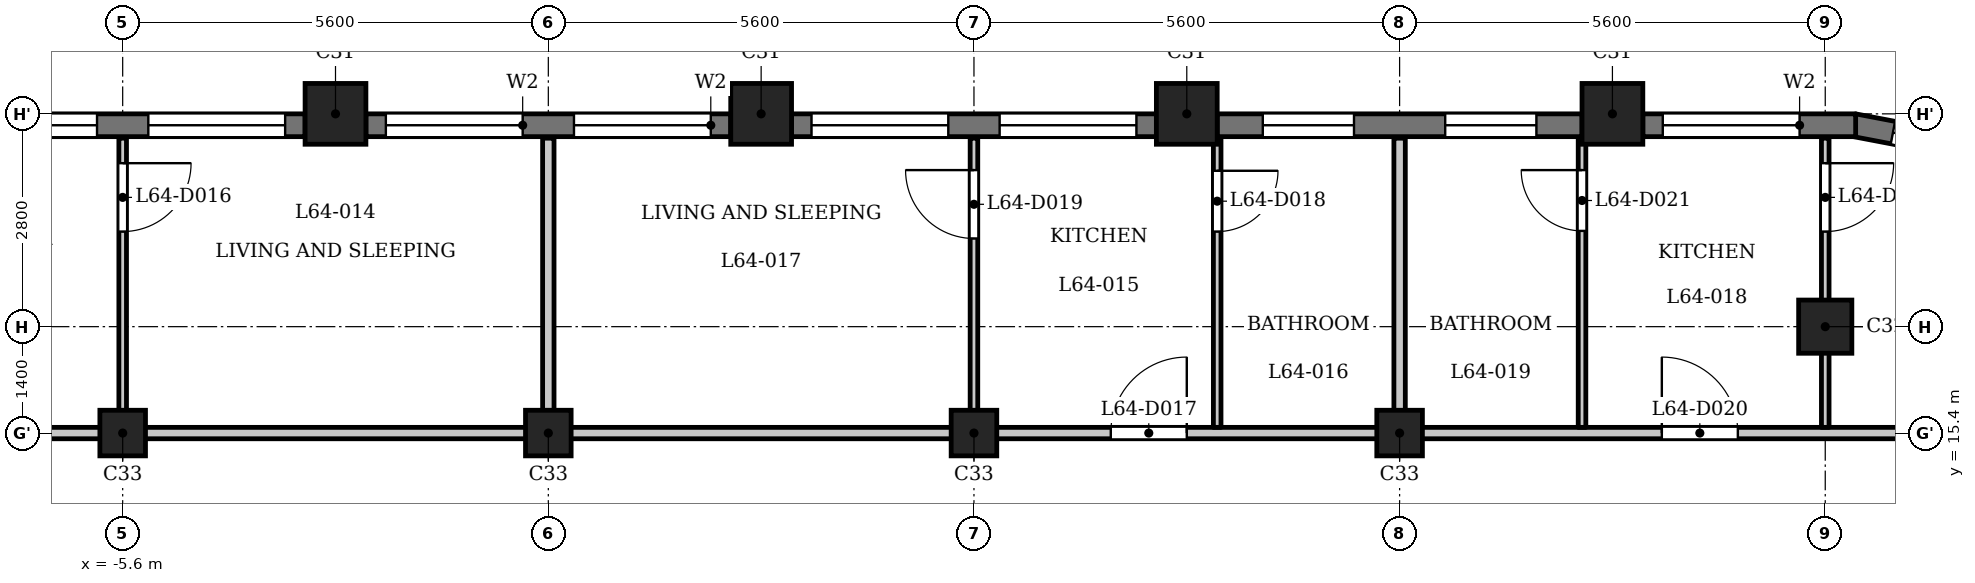
"""IFC4 building model, lengths in metres.
Left out: names, types, materials, properties, quantities, classifications, styles, units other than length and angle.
Written with IfcOpenShell. Run it as: python <this file> out.ifc"""

import sys

from ifc_helpers import new_model, si_unit, direction, frame, frame_2d, origin, origin_2d, place, context, subcontext, project, spatial, rectangle, extrude, element, fill, save


model = new_model("IFC4")
c1 = context("Model", 3, precision=1e-05, world=origin(), true_north=direction((0.0, 1.0)))
c2 = subcontext(c1, "Body", "Model", "MODEL_VIEW")
j1 = project(units=[si_unit("LENGTHUNIT", "METRE"), si_unit("PLANEANGLEUNIT", "RADIAN")], contexts=[c1])
p1 = place(None, origin())
s1 = spatial("IfcSite", under=j1, at=p1, CompositionType="ELEMENT")
p2 = place(p1, origin())
s2 = spatial("IfcBuilding", under=s1, at=p2, CompositionType="ELEMENT")
p3 = place(p2, frame((0.0, 0.0, 248.7)))
s3 = spatial("IfcBuildingStorey", under=s2, at=p3, CompositionType="ELEMENT", Elevation=248.7)
for number, where, z_axis, x_axis in (
    (1, (14.0, 19.6, 0.0), (0.0, 0.0, 1.0), (1.0, 0.0, 0.0)),
    (2, (8.4, 19.6, 0.0), (0.0, 0.0, 1.0), (1.0, 0.0, 0.0)),
    (3, (2.8, 19.6, 0.0), (0.0, 0.0, 1.0), (1.0, 0.0, 0.0)),
    (4, (-2.8, 19.6, 0.0), (0.0, 0.0, 1.0), (1.0, 0.0, 0.0)),
):
    element("IfcColumn", number, at=place(p3, frame(where, z_axis=z_axis, x_axis=x_axis)), inside=s3, PredefinedType="COLUMN", context=c2, shape_type="SweptSolid", body=[
        extrude(rectangle(XDim=0.8, YDim=0.8, at=origin_2d()), origin(), (0.0, 0.0, 1.0), 3.5),
    ])
p4 = place(p3, frame((16.8, 16.8, 0.0), z_axis=(0.0, 0.0, 1.0), x_axis=(1.0, 0.0, 0.0)))
e5 = element("IfcColumn", 5, at=p4, inside=s3, PredefinedType="COLUMN", context=c2, shape_type="SweptSolid", body=[
    extrude(rectangle(XDim=0.7, YDim=0.7, at=origin_2d()), origin(), (0.0, 0.0, 1.0), 3.5),
])
for number, where, z_axis, x_axis in (
    (6, (-5.6, 15.4, 0.0), (0.0, 0.0, 1.0), (1.0, 0.0, 0.0)),
    (7, (0.0, 15.4, 0.0), (0.0, 0.0, 1.0), (1.0, 0.0, 0.0)),
    (8, (5.6, 15.4, 0.0), (0.0, 0.0, 1.0), (1.0, 0.0, 0.0)),
    (9, (11.2, 15.4, 0.0), (0.0, 0.0, 1.0), (1.0, 0.0, 0.0)),
):
    element("IfcColumn", number, at=place(p3, frame(where, z_axis=z_axis, x_axis=x_axis)), inside=s3, PredefinedType="COLUMN", context=c2, shape_type="SweptSolid", body=[
        extrude(rectangle(XDim=0.6, YDim=0.6, at=origin_2d()), origin(), (0.0, 0.0, 1.0), 3.5),
    ])
p5 = place(p3, frame((18.995, 19.105, 0.0), z_axis=(0.0, 0.0, 1.0), x_axis=(-0.982301706131, 0.187305520826, 0.0)))
e10 = element("IfcWall", 10, at=p5, inside=s3, PredefinedType="SOLIDWALL", context=c2, shape_type="SweptSolid", body=[
    extrude(rectangle(XDim=1.856, YDim=0.3, at=frame_2d((0.928, 0.0))), origin(), (0.0, 0.0, 1.0), 2.55),
])
p6 = place(p5, frame((0.528, 0.0, 0.6)))
e11 = element("IfcOpeningElement", 11, at=p6, cuts=e10, PredefinedType="OPENING", context=c2, shape_type="SweptSolid", body=[
    extrude(rectangle(XDim=0.8, YDim=1.55, at=frame_2d((0.4, 0.775))), frame((0.0, 0.16, 0.0), z_axis=(0.0, -1.0, 0.0), x_axis=(1.0, 0.0, 0.0)), (0.0, 0.0, 1.0), 0.32),
])
p7 = place(p3, frame((17.2, 19.45, 0.0), z_axis=(0.0, 0.0, 1.0), x_axis=(-1.0, 0.0, 0.0)))
e12 = element("IfcWall", 12, at=p7, inside=s3, PredefinedType="SOLIDWALL", context=c2, shape_type="SweptSolid", body=[
    extrude(rectangle(XDim=2.8, YDim=0.3, at=frame_2d((1.4, 0.0))), origin(), (0.0, 0.0, 1.0), 2.55),
])
p8 = place(p7, frame((0.738, 0.0, 0.9)))
e13 = element("IfcOpeningElement", 13, at=p8, cuts=e12, PredefinedType="OPENING", context=c2, shape_type="SweptSolid", body=[
    extrude(rectangle(XDim=1.8, YDim=1.25, at=frame_2d((0.9, 0.625))), frame((0.0, 0.16, 0.0), z_axis=(0.0, -1.0, 0.0), x_axis=(1.0, 0.0, 0.0)), (0.0, 0.0, 1.0), 0.32),
])
p9 = place(p3, frame((13.6, 19.45, 0.0), z_axis=(0.0, 0.0, 1.0), x_axis=(-1.0, 0.0, 0.0)))
e14 = element("IfcWall", 14, at=p9, inside=s3, PredefinedType="SOLIDWALL", context=c2, shape_type="SweptSolid", body=[
    extrude(rectangle(XDim=4.8, YDim=0.3, at=frame_2d((2.4, 0.0))), origin(), (0.0, 0.0, 1.0), 2.55),
])
p10 = place(p9, frame((0.6, 0.0, 0.6)))
e15 = element("IfcOpeningElement", 15, at=p10, cuts=e14, PredefinedType="OPENING", context=c2, shape_type="SweptSolid", body=[
    extrude(rectangle(XDim=1.2, YDim=1.55, at=frame_2d((0.6, 0.775))), frame((0.0, 0.16, 0.0), z_axis=(0.0, -1.0, 0.0), x_axis=(1.0, 0.0, 0.0)), (0.0, 0.0, 1.0), 0.32),
])
p11 = place(p9, frame((3.0, 0.0, 0.6)))
e16 = element("IfcOpeningElement", 16, at=p11, cuts=e14, PredefinedType="OPENING", context=c2, shape_type="SweptSolid", body=[
    extrude(rectangle(XDim=1.2, YDim=1.55, at=frame_2d((0.6, 0.775))), frame((0.0, 0.16, 0.0), z_axis=(0.0, -1.0, 0.0), x_axis=(1.0, 0.0, 0.0)), (0.0, 0.0, 1.0), 0.32),
])
p12 = place(p3, frame((8.0, 19.45, 0.0), z_axis=(0.0, 0.0, 1.0), x_axis=(-1.0, 0.0, 0.0)))
e17 = element("IfcWall", 17, at=p12, inside=s3, PredefinedType="SOLIDWALL", context=c2, shape_type="SweptSolid", body=[
    extrude(rectangle(XDim=4.8, YDim=0.3, at=frame_2d((2.4, 0.0))), origin(), (0.0, 0.0, 1.0), 2.55),
])
p13 = place(p12, frame((0.262, 0.0, 0.9)))
e18 = element("IfcOpeningElement", 18, at=p13, cuts=e17, PredefinedType="OPENING", context=c2, shape_type="SweptSolid", body=[
    extrude(rectangle(XDim=1.8, YDim=1.25, at=frame_2d((0.9, 0.625))), frame((0.0, 0.16, 0.0), z_axis=(0.0, -1.0, 0.0), x_axis=(1.0, 0.0, 0.0)), (0.0, 0.0, 1.0), 0.32),
])
p14 = place(p12, frame((2.738, 0.0, 0.9)))
e19 = element("IfcOpeningElement", 19, at=p14, cuts=e17, PredefinedType="OPENING", context=c2, shape_type="SweptSolid", body=[
    extrude(rectangle(XDim=1.8, YDim=1.25, at=frame_2d((0.9, 0.625))), frame((0.0, 0.16, 0.0), z_axis=(0.0, -1.0, 0.0), x_axis=(1.0, 0.0, 0.0)), (0.0, 0.0, 1.0), 0.32),
])
p15 = place(p3, frame((2.4, 19.45, 0.0), z_axis=(0.0, 0.0, 1.0), x_axis=(-1.0, 0.0, 0.0)))
e20 = element("IfcWall", 20, at=p15, inside=s3, PredefinedType="SOLIDWALL", context=c2, shape_type="SweptSolid", body=[
    extrude(rectangle(XDim=4.8, YDim=0.3, at=frame_2d((2.4, 0.0))), origin(), (0.0, 0.0, 1.0), 2.55),
])
p16 = place(p15, frame((0.262, 0.0, 0.9)))
e21 = element("IfcOpeningElement", 21, at=p16, cuts=e20, PredefinedType="OPENING", context=c2, shape_type="SweptSolid", body=[
    extrude(rectangle(XDim=1.8, YDim=1.25, at=frame_2d((0.9, 0.625))), frame((0.0, 0.16, 0.0), z_axis=(0.0, -1.0, 0.0), x_axis=(1.0, 0.0, 0.0)), (0.0, 0.0, 1.0), 0.32),
])
p17 = place(p15, frame((2.738, 0.0, 0.9)))
e22 = element("IfcOpeningElement", 22, at=p17, cuts=e20, PredefinedType="OPENING", context=c2, shape_type="SweptSolid", body=[
    extrude(rectangle(XDim=1.8, YDim=1.25, at=frame_2d((0.9, 0.625))), frame((0.0, 0.16, 0.0), z_axis=(0.0, -1.0, 0.0), x_axis=(1.0, 0.0, 0.0)), (0.0, 0.0, 1.0), 0.32),
])
p18 = place(p3, frame((-3.2, 19.45, 0.0), z_axis=(0.0, 0.0, 1.0), x_axis=(-1.0, 0.0, 0.0)))
e23 = element("IfcWall", 23, at=p18, inside=s3, PredefinedType="SOLIDWALL", context=c2, shape_type="SweptSolid", body=[
    extrude(rectangle(XDim=4.8, YDim=0.3, at=frame_2d((2.4, 0.0))), origin(), (0.0, 0.0, 1.0), 2.55),
])
p19 = place(p18, frame((0.262, 0.0, 0.9)))
e24 = element("IfcOpeningElement", 24, at=p19, cuts=e23, PredefinedType="OPENING", context=c2, shape_type="SweptSolid", body=[
    extrude(rectangle(XDim=1.8, YDim=1.25, at=frame_2d((0.9, 0.625))), frame((0.0, 0.16, 0.0), z_axis=(0.0, -1.0, 0.0), x_axis=(1.0, 0.0, 0.0)), (0.0, 0.0, 1.0), 0.32),
])
p20 = place(p18, frame((2.738, 0.0, 0.9)))
e25 = element("IfcOpeningElement", 25, at=p20, cuts=e23, PredefinedType="OPENING", context=c2, shape_type="SweptSolid", body=[
    extrude(rectangle(XDim=1.8, YDim=1.25, at=frame_2d((0.9, 0.625))), frame((0.0, 0.16, 0.0), z_axis=(0.0, -1.0, 0.0), x_axis=(1.0, 0.0, 0.0)), (0.0, 0.0, 1.0), 0.32),
])
p21 = place(p3, frame((-23.55, 15.4, 0.0), z_axis=(0.0, 0.0, 1.0), x_axis=(1.0, 0.0, 0.0)))
e26 = element("IfcWall", 26, at=p21, inside=s3, PredefinedType="PARTITIONING", context=c2, shape_type="SweptSolid", body=[
    extrude(rectangle(XDim=46.872, YDim=0.15, at=frame_2d((23.436, 0.0))), origin(), (0.0, 0.0, 1.0), 3.2),
])
p22 = place(p21, frame((8.05, 0.0, 0.0)))
e27 = element("IfcOpeningElement", 27, at=p22, cuts=e26, PredefinedType="OPENING", context=c2, shape_type="SweptSolid", body=[
    extrude(rectangle(XDim=1.0, YDim=2.1, at=frame_2d((0.5, 1.05))), frame((0.0, 0.085, 0.0), z_axis=(0.0, -1.0, 0.0), x_axis=(1.0, 0.0, 0.0)), (0.0, 0.0, 1.0), 0.17),
])
p23 = place(p21, frame((15.05, 0.0, 0.0)))
e28 = element("IfcOpeningElement", 28, at=p23, cuts=e26, PredefinedType="OPENING", context=c2, shape_type="SweptSolid", body=[
    extrude(rectangle(XDim=1.0, YDim=2.1, at=frame_2d((0.5, 1.05))), frame((0.0, 0.085, 0.0), z_axis=(0.0, -1.0, 0.0), x_axis=(1.0, 0.0, 0.0)), (0.0, 0.0, 1.0), 0.17),
])
p24 = place(p21, frame((30.95, 0.0, 0.0)))
e29 = element("IfcOpeningElement", 29, at=p24, cuts=e26, PredefinedType="OPENING", context=c2, shape_type="SweptSolid", body=[
    extrude(rectangle(XDim=1.0, YDim=2.1, at=frame_2d((0.5, 1.05))), frame((0.0, 0.085, 0.0), z_axis=(0.0, -1.0, 0.0), x_axis=(1.0, 0.0, 0.0)), (0.0, 0.0, 1.0), 0.17),
])
p25 = place(p21, frame((38.2, 0.0, 0.0)))
e30 = element("IfcOpeningElement", 30, at=p25, cuts=e26, PredefinedType="OPENING", context=c2, shape_type="SweptSolid", body=[
    extrude(rectangle(XDim=1.0, YDim=2.1, at=frame_2d((0.5, 1.05))), frame((0.0, 0.085, 0.0), z_axis=(0.0, -1.0, 0.0), x_axis=(1.0, 0.0, 0.0)), (0.0, 0.0, 1.0), 0.17),
])
p26 = place(p3, frame((-5.6, 15.475, 0.0), z_axis=(0.0, 0.0, 1.0), x_axis=(0.0, 1.0, 0.0)))
e31 = element("IfcWall", 31, at=p26, inside=s3, PredefinedType="PARTITIONING", context=c2, shape_type="SweptSolid", body=[
    extrude(rectangle(XDim=3.805, YDim=0.1, at=frame_2d((1.902, 0.0))), origin(), (0.0, 0.0, 1.0), 3.2),
])
p27 = place(p26, frame((2.576, 0.0, 0.0)))
e32 = element("IfcOpeningElement", 32, at=p27, cuts=e31, PredefinedType="OPENING", context=c2, shape_type="SweptSolid", body=[
    extrude(rectangle(XDim=0.9, YDim=2.1, at=frame_2d((0.45, 1.05))), frame((0.0, 0.06, 0.0), z_axis=(0.0, -1.0, 0.0), x_axis=(1.0, 0.0, 0.0)), (0.0, 0.0, 1.0), 0.12),
])
p28 = place(p3, frame((0.0, 15.475, 0.0), z_axis=(0.0, 0.0, 1.0), x_axis=(0.0, 1.0, 0.0)))
e33 = element("IfcWall", 33, at=p28, inside=s3, PredefinedType="PARTITIONING", context=c2, shape_type="SweptSolid", body=[
    extrude(rectangle(XDim=3.805, YDim=0.15, at=frame_2d((1.902, 0.0))), origin(), (0.0, 0.0, 1.0), 3.2),
])
p29 = place(p3, frame((5.6, 15.475, 0.0), z_axis=(0.0, 0.0, 1.0), x_axis=(0.0, 1.0, 0.0)))
e34 = element("IfcWall", 34, at=p29, inside=s3, PredefinedType="PARTITIONING", context=c2, shape_type="SweptSolid", body=[
    extrude(rectangle(XDim=3.805, YDim=0.1, at=frame_2d((1.902, 0.0))), origin(), (0.0, 0.0, 1.0), 3.2),
])
p30 = place(p29, frame((2.485, 0.0, 0.0)))
e35 = element("IfcOpeningElement", 35, at=p30, cuts=e34, PredefinedType="OPENING", context=c2, shape_type="SweptSolid", body=[
    extrude(rectangle(XDim=0.9, YDim=2.1, at=frame_2d((0.45, 1.05))), frame((0.0, 0.06, 0.0), z_axis=(0.0, -1.0, 0.0), x_axis=(1.0, 0.0, 0.0)), (0.0, 0.0, 1.0), 0.12),
])
p31 = place(p3, frame((8.8, 15.475, 0.0), z_axis=(0.0, 0.0, 1.0), x_axis=(0.0, 1.0, 0.0)))
e36 = element("IfcWall", 36, at=p31, inside=s3, PredefinedType="PARTITIONING", context=c2, shape_type="SweptSolid", body=[
    extrude(rectangle(XDim=3.805, YDim=0.1, at=frame_2d((1.902, 0.0))), origin(), (0.0, 0.0, 1.0), 3.2),
])
p32 = place(p31, frame((2.576, 0.0, 0.0)))
e37 = element("IfcOpeningElement", 37, at=p32, cuts=e36, PredefinedType="OPENING", context=c2, shape_type="SweptSolid", body=[
    extrude(rectangle(XDim=0.8, YDim=2.1, at=frame_2d((0.4, 1.05))), frame((0.0, 0.06, 0.0), z_axis=(0.0, -1.0, 0.0), x_axis=(1.0, 0.0, 0.0)), (0.0, 0.0, 1.0), 0.12),
])
p33 = place(p3, frame((11.2, 15.475, 0.0), z_axis=(0.0, 0.0, 1.0), x_axis=(0.0, 1.0, 0.0)))
e38 = element("IfcWall", 38, at=p33, inside=s3, PredefinedType="PARTITIONING", context=c2, shape_type="SweptSolid", body=[
    extrude(rectangle(XDim=3.805, YDim=0.15, at=frame_2d((1.902, 0.0))), origin(), (0.0, 0.0, 1.0), 3.2),
])
p34 = place(p3, frame((13.6, 15.475, 0.0), z_axis=(0.0, 0.0, 1.0), x_axis=(0.0, 1.0, 0.0)))
e39 = element("IfcWall", 39, at=p34, inside=s3, PredefinedType="PARTITIONING", context=c2, shape_type="SweptSolid", body=[
    extrude(rectangle(XDim=3.805, YDim=0.1, at=frame_2d((1.902, 0.0))), origin(), (0.0, 0.0, 1.0), 3.2),
])
p35 = place(p34, frame((2.585, 0.0, 0.0)))
e40 = element("IfcOpeningElement", 40, at=p35, cuts=e39, PredefinedType="OPENING", context=c2, shape_type="SweptSolid", body=[
    extrude(rectangle(XDim=0.8, YDim=2.1, at=frame_2d((0.4, 1.05))), frame((0.0, 0.06, 0.0), z_axis=(0.0, -1.0, 0.0), x_axis=(1.0, 0.0, 0.0)), (0.0, 0.0, 1.0), 0.12),
])
p36 = place(p3, frame((16.8, 15.475, 0.0), z_axis=(0.0, 0.0, 1.0), x_axis=(0.0, 1.0, 0.0)))
e41 = element("IfcWall", 41, at=p36, inside=s3, PredefinedType="PARTITIONING", context=c2, shape_type="SweptSolid", body=[
    extrude(rectangle(XDim=3.805, YDim=0.1, at=frame_2d((1.902, 0.0))), origin(), (0.0, 0.0, 1.0), 3.2),
])
p37 = place(p36, frame((2.576, 0.0, 0.0)))
e42 = element("IfcOpeningElement", 42, at=p37, cuts=e41, PredefinedType="OPENING", context=c2, shape_type="SweptSolid", body=[
    extrude(rectangle(XDim=0.9, YDim=2.1, at=frame_2d((0.45, 1.05))), frame((0.0, 0.06, 0.0), z_axis=(0.0, -1.0, 0.0), x_axis=(1.0, 0.0, 0.0)), (0.0, 0.0, 1.0), 0.12),
])
p38 = place(p27, origin())
e43 = element("IfcDoor", 43, at=p38, inside=s3, OperationType="SINGLE_SWING_RIGHT", PredefinedType="DOOR", context=c2, shape_type="SweptSolid", body=[
    extrude(rectangle(XDim=0.9, YDim=2.1, at=frame_2d((0.45, 1.05))), frame((0.0, 0.025, 0.0), z_axis=(0.0, -1.0, 0.0), x_axis=(1.0, 0.0, 0.0)), (0.0, 0.0, 1.0), 0.05),
])
fill(e32, e43)
p39 = place(p24, origin())
e44 = element("IfcDoor", 44, at=p39, inside=s3, OperationType="SINGLE_SWING_LEFT", PredefinedType="DOOR", context=c2, shape_type="SweptSolid", body=[
    extrude(rectangle(XDim=1.0, YDim=2.1, at=frame_2d((0.5, 1.05))), frame((0.0, 0.025, 0.0), z_axis=(0.0, -1.0, 0.0), x_axis=(1.0, 0.0, 0.0)), (0.0, 0.0, 1.0), 0.05),
])
fill(e29, e44)
p40 = place(p32, origin())
e45 = element("IfcDoor", 45, at=p40, inside=s3, OperationType="SINGLE_SWING_RIGHT", PredefinedType="DOOR", context=c2, shape_type="SweptSolid", body=[
    extrude(rectangle(XDim=0.8, YDim=2.1, at=frame_2d((0.4, 1.05))), frame((0.0, 0.025, 0.0), z_axis=(0.0, -1.0, 0.0), x_axis=(1.0, 0.0, 0.0)), (0.0, 0.0, 1.0), 0.05),
])
fill(e37, e45)
p41 = place(p30, origin())
e46 = element("IfcDoor", 46, at=p41, inside=s3, OperationType="SINGLE_SWING_LEFT", PredefinedType="DOOR", context=c2, shape_type="SweptSolid", body=[
    extrude(rectangle(XDim=0.9, YDim=2.1, at=frame_2d((0.45, 1.05))), frame((0.0, 0.025, 0.0), z_axis=(0.0, -1.0, 0.0), x_axis=(1.0, 0.0, 0.0)), (0.0, 0.0, 1.0), 0.05),
])
fill(e35, e46)
p42 = place(p25, origin())
e47 = element("IfcDoor", 47, at=p42, inside=s3, OperationType="SINGLE_SWING_RIGHT", PredefinedType="DOOR", context=c2, shape_type="SweptSolid", body=[
    extrude(rectangle(XDim=1.0, YDim=2.1, at=frame_2d((0.5, 1.05))), frame((0.0, 0.025, 0.0), z_axis=(0.0, -1.0, 0.0), x_axis=(1.0, 0.0, 0.0)), (0.0, 0.0, 1.0), 0.05),
])
fill(e30, e47)
p43 = place(p35, origin())
e48 = element("IfcDoor", 48, at=p43, inside=s3, OperationType="SINGLE_SWING_LEFT", PredefinedType="DOOR", context=c2, shape_type="SweptSolid", body=[
    extrude(rectangle(XDim=0.8, YDim=2.1, at=frame_2d((0.4, 1.05))), frame((0.0, 0.025, 0.0), z_axis=(0.0, -1.0, 0.0), x_axis=(1.0, 0.0, 0.0)), (0.0, 0.0, 1.0), 0.05),
])
fill(e40, e48)
p44 = place(p37, origin())
e49 = element("IfcDoor", 49, at=p44, inside=s3, OperationType="SINGLE_SWING_RIGHT", PredefinedType="DOOR", context=c2, shape_type="SweptSolid", body=[
    extrude(rectangle(XDim=0.9, YDim=2.1, at=frame_2d((0.45, 1.05))), frame((0.0, 0.025, 0.0), z_axis=(0.0, -1.0, 0.0), x_axis=(1.0, 0.0, 0.0)), (0.0, 0.0, 1.0), 0.05),
])
fill(e42, e49)
p45 = place(p6, origin())
e50 = element("IfcWindow", 50, at=p45, inside=s3, PartitioningType="SINGLE_PANEL", PredefinedType="WINDOW", context=c2, shape_type="SweptSolid", body=[
    extrude(rectangle(XDim=0.8, YDim=1.55, at=frame_2d((0.4, 0.775))), frame((0.0, 0.03, 0.0), z_axis=(0.0, -1.0, 0.0), x_axis=(1.0, 0.0, 0.0)), (0.0, 0.0, 1.0), 0.06),
])
fill(e11, e50)
p46 = place(p8, origin())
e51 = element("IfcWindow", 51, at=p46, inside=s3, PartitioningType="SINGLE_PANEL", PredefinedType="WINDOW", context=c2, shape_type="SweptSolid", body=[
    extrude(rectangle(XDim=1.8, YDim=1.25, at=frame_2d((0.9, 0.625))), frame((0.0, 0.03, 0.0), z_axis=(0.0, -1.0, 0.0), x_axis=(1.0, 0.0, 0.0)), (0.0, 0.0, 1.0), 0.06),
])
fill(e13, e51)
p47 = place(p10, origin())
e52 = element("IfcWindow", 52, at=p47, inside=s3, PartitioningType="SINGLE_PANEL", PredefinedType="WINDOW", context=c2, shape_type="SweptSolid", body=[
    extrude(rectangle(XDim=1.2, YDim=1.55, at=frame_2d((0.6, 0.775))), frame((0.0, 0.03, 0.0), z_axis=(0.0, -1.0, 0.0), x_axis=(1.0, 0.0, 0.0)), (0.0, 0.0, 1.0), 0.06),
])
fill(e15, e52)
p48 = place(p11, origin())
e53 = element("IfcWindow", 53, at=p48, inside=s3, PartitioningType="SINGLE_PANEL", PredefinedType="WINDOW", context=c2, shape_type="SweptSolid", body=[
    extrude(rectangle(XDim=1.2, YDim=1.55, at=frame_2d((0.6, 0.775))), frame((0.0, 0.03, 0.0), z_axis=(0.0, -1.0, 0.0), x_axis=(1.0, 0.0, 0.0)), (0.0, 0.0, 1.0), 0.06),
])
fill(e16, e53)
p49 = place(p13, origin())
e54 = element("IfcWindow", 54, at=p49, inside=s3, PartitioningType="SINGLE_PANEL", PredefinedType="WINDOW", context=c2, shape_type="SweptSolid", body=[
    extrude(rectangle(XDim=1.8, YDim=1.25, at=frame_2d((0.9, 0.625))), frame((0.0, 0.03, 0.0), z_axis=(0.0, -1.0, 0.0), x_axis=(1.0, 0.0, 0.0)), (0.0, 0.0, 1.0), 0.06),
])
fill(e18, e54)
p50 = place(p14, origin())
e55 = element("IfcWindow", 55, at=p50, inside=s3, PartitioningType="SINGLE_PANEL", PredefinedType="WINDOW", context=c2, shape_type="SweptSolid", body=[
    extrude(rectangle(XDim=1.8, YDim=1.25, at=frame_2d((0.9, 0.625))), frame((0.0, 0.03, 0.0), z_axis=(0.0, -1.0, 0.0), x_axis=(1.0, 0.0, 0.0)), (0.0, 0.0, 1.0), 0.06),
])
fill(e19, e55)
p51 = place(p16, origin())
e56 = element("IfcWindow", 56, at=p51, inside=s3, PartitioningType="SINGLE_PANEL", PredefinedType="WINDOW", context=c2, shape_type="SweptSolid", body=[
    extrude(rectangle(XDim=1.8, YDim=1.25, at=frame_2d((0.9, 0.625))), frame((0.0, 0.03, 0.0), z_axis=(0.0, -1.0, 0.0), x_axis=(1.0, 0.0, 0.0)), (0.0, 0.0, 1.0), 0.06),
])
fill(e21, e56)
p52 = place(p17, origin())
e57 = element("IfcWindow", 57, at=p52, inside=s3, PartitioningType="SINGLE_PANEL", PredefinedType="WINDOW", context=c2, shape_type="SweptSolid", body=[
    extrude(rectangle(XDim=1.8, YDim=1.25, at=frame_2d((0.9, 0.625))), frame((0.0, 0.03, 0.0), z_axis=(0.0, -1.0, 0.0), x_axis=(1.0, 0.0, 0.0)), (0.0, 0.0, 1.0), 0.06),
])
fill(e22, e57)
p53 = place(p19, origin())
e58 = element("IfcWindow", 58, at=p53, inside=s3, PartitioningType="SINGLE_PANEL", PredefinedType="WINDOW", context=c2, shape_type="SweptSolid", body=[
    extrude(rectangle(XDim=1.8, YDim=1.25, at=frame_2d((0.9, 0.625))), frame((0.0, 0.03, 0.0), z_axis=(0.0, -1.0, 0.0), x_axis=(1.0, 0.0, 0.0)), (0.0, 0.0, 1.0), 0.06),
])
fill(e24, e58)
p54 = place(p20, origin())
e59 = element("IfcWindow", 59, at=p54, inside=s3, PartitioningType="SINGLE_PANEL", PredefinedType="WINDOW", context=c2, shape_type="SweptSolid", body=[
    extrude(rectangle(XDim=1.8, YDim=1.25, at=frame_2d((0.9, 0.625))), frame((0.0, 0.03, 0.0), z_axis=(0.0, -1.0, 0.0), x_axis=(1.0, 0.0, 0.0)), (0.0, 0.0, 1.0), 0.06),
])
fill(e25, e59)
save(model, sys.argv[1])
